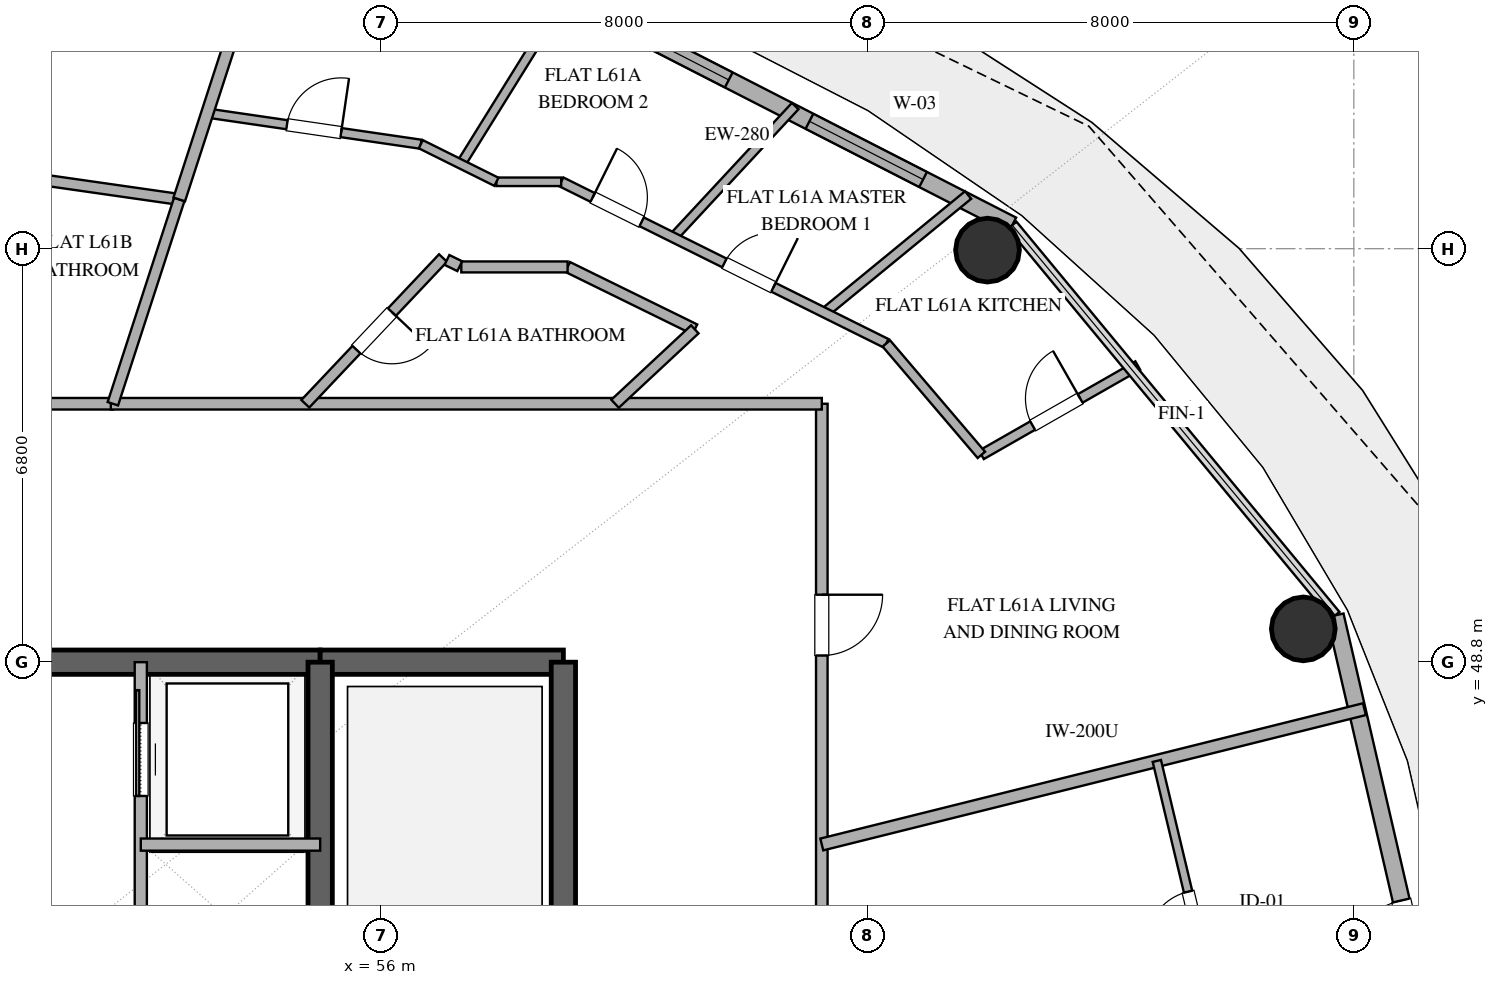
"""IFC4 building model, lengths in metres.
Left out: names, types, materials, properties, quantities, classifications, styles, units other than length and angle.
Written with IfcOpenShell. Run it as: python <this file> out.ifc"""

import sys

from ifc_helpers import new_model, si_unit, direction, frame, frame_2d, origin, origin_2d, place, context, subcontext, project, spatial, rectangle, hollow_circle, extrude, element, fill, save


model = new_model("IFC4")
c1 = context("Model", 3, precision=1e-05, world=origin(), true_north=direction((0.0, 1.0)))
c2 = subcontext(c1, "Body", "Model", "MODEL_VIEW")
j1 = project(units=[si_unit("LENGTHUNIT", "METRE"), si_unit("PLANEANGLEUNIT", "RADIAN")], contexts=[c1])
p1 = place(None, origin())
s1 = spatial("IfcSite", under=j1, at=p1, CompositionType="ELEMENT")
p2 = place(p1, origin())
s2 = spatial("IfcBuilding", under=s1, at=p2, CompositionType="ELEMENT")
p3 = place(p2, frame((0.0, 0.0, 238.8)))
s3 = spatial("IfcBuildingStorey", under=s2, at=p3, CompositionType="ELEMENT", Elevation=238.8)
p4 = place(p3, frame((41.0, 48.8, 0.0), z_axis=(0.0, 0.0, 1.0), x_axis=(1.0, 0.0, 0.0)))
e1 = element("IfcWall", 1, at=p4, inside=s3, PredefinedType="SHEAR", context=c2, shape_type="SweptSolid", body=[
    extrude(rectangle(XDim=14.0, YDim=0.4, at=frame_2d((7.0, 0.0))), origin(), (0.0, 0.0, 1.0), 3.36),
])
p5 = place(p4, frame((6.1, 0.0, 0.0)))
e2 = element("IfcOpeningElement", 2, at=p5, cuts=e1, PredefinedType="OPENING", context=c2, shape_type="SweptSolid", body=[
    extrude(rectangle(XDim=1.8, YDim=2.25, at=frame_2d((0.9, 1.125))), frame((0.0, 0.21, 0.0), z_axis=(0.0, -1.0, 0.0), x_axis=(1.0, 0.0, 0.0)), (0.0, 0.0, 1.0), 0.42),
])
p6 = place(p3, frame((55.0, 48.8, 0.0), z_axis=(0.0, 0.0, 1.0), x_axis=(1.0, 0.0, 0.0)))
e3 = element("IfcWall", 3, at=p6, inside=s3, PredefinedType="SHEAR", context=c2, shape_type="SweptSolid", body=[
    extrude(rectangle(XDim=4.0, YDim=0.4, at=frame_2d((2.0, 0.0))), origin(), (0.0, 0.0, 1.0), 3.36),
])
p7 = place(p3, frame((59.0, 35.2, 0.0), z_axis=(0.0, 0.0, 1.0), x_axis=(0.0, 1.0, 0.0)))
e4 = element("IfcWall", 4, at=p7, inside=s3, PredefinedType="SHEAR", context=c2, shape_type="SweptSolid", body=[
    extrude(rectangle(XDim=13.6, YDim=0.4, at=frame_2d((6.8, 0.0))), origin(), (0.0, 0.0, 1.0), 3.36),
])
p8 = place(p3, frame((55.0, 35.2, 0.0), z_axis=(0.0, 0.0, 1.0), x_axis=(0.0, 1.0, 0.0)))
e5 = element("IfcWall", 5, at=p8, inside=s3, PredefinedType="SHEAR", context=c2, shape_type="SweptSolid", body=[
    extrude(rectangle(XDim=13.6, YDim=0.4, at=frame_2d((6.8, 0.0))), origin(), (0.0, 0.0, 1.0), 3.36),
])
p9 = place(p8, frame((1.15, 0.0, 0.0)))
e6 = element("IfcOpeningElement", 6, at=p9, cuts=e5, PredefinedType="OPENING", context=c2, shape_type="SweptSolid", body=[
    extrude(rectangle(XDim=1.1, YDim=2.2, at=frame_2d((0.55, 1.1))), frame((0.0, 0.21, 0.0), z_axis=(0.0, -1.0, 0.0), x_axis=(1.0, 0.0, 0.0)), (0.0, 0.0, 1.0), 0.42),
])
for number, where, z_axis, x_axis in (
    (7, (71.169, 49.347, 0.0), (0.0, 0.0, 1.0), (1.0, 0.0, 0.0)),
    (8, (65.975, 55.576, 0.0), (0.0, 0.0, 1.0), (1.0, 0.0, 0.0)),
):
    element("IfcColumn", number, at=place(p3, frame(where, z_axis=z_axis, x_axis=x_axis)), inside=s3, PredefinedType="COLUMN", context=c2, shape_type="SweptSolid", body=[
        extrude(hollow_circle(Radius=0.525, WallThickness=0.028, at=origin_2d()), origin(), (0.0, 0.0, 1.0), 3.36),
    ])
p10 = place(p3, frame((73.447, 42.0, 0.0), z_axis=(0.0, 0.0, 1.0), x_axis=(-0.225635078214, 0.974211892495, 0.0)))
e9 = element("IfcWall", 9, at=p10, inside=s3, PredefinedType="SOLIDWALL", context=c2, shape_type="SweptSolid", body=[
    extrude(rectangle(XDim=7.77, YDim=0.28, at=frame_2d((3.885, 0.0))), origin(), (0.0, 0.0, 1.0), 3.36),
])
p11 = place(p10, frame((1.557, 0.0, 0.0)))
e10 = element("IfcOpeningElement", 10, at=p11, cuts=e9, PredefinedType="OPENING", context=c2, shape_type="SweptSolid", body=[
    extrude(rectangle(XDim=1.4, YDim=2.2, at=frame_2d((0.7, 1.1))), frame((0.0, 0.15, 0.0), z_axis=(0.0, -1.0, 0.0), x_axis=(1.0, 0.0, 0.0)), (0.0, 0.0, 1.0), 0.3),
])
p12 = place(p3, frame((66.383, 55.987, 0.0), z_axis=(0.0, 0.0, 1.0), x_axis=(-0.890007394051, 0.455946091699, 0.0)))
e11 = element("IfcWall", 11, at=p12, inside=s3, PredefinedType="SOLIDWALL", context=c2, shape_type="SweptSolid", body=[
    extrude(rectangle(XDim=9.404, YDim=0.28, at=frame_2d((4.702, 0.0))), origin(), (0.0, 0.0, 1.0), 3.36),
])
p13 = place(p12, frame((1.648, 0.0, 0.85)))
e12 = element("IfcOpeningElement", 12, at=p13, cuts=e11, PredefinedType="OPENING", context=c2, shape_type="SweptSolid", body=[
    extrude(rectangle(XDim=2.1, YDim=2.2, at=frame_2d((1.05, 1.1))), frame((0.0, 0.15, 0.0), z_axis=(0.0, -1.0, 0.0), x_axis=(1.0, 0.0, 0.0)), (0.0, 0.0, 1.0), 0.3),
])
p14 = place(p12, frame((5.239, 0.0, 0.85)))
e13 = element("IfcOpeningElement", 13, at=p14, cuts=e11, PredefinedType="OPENING", context=c2, shape_type="SweptSolid", body=[
    extrude(rectangle(XDim=1.8, YDim=2.2, at=frame_2d((0.9, 1.1))), frame((0.0, 0.15, 0.0), z_axis=(0.0, -1.0, 0.0), x_axis=(1.0, 0.0, 0.0)), (0.0, 0.0, 1.0), 0.3),
])
p15 = place(p3, frame((52.05, 38.4, 0.0), z_axis=(0.0, 0.0, 1.0), x_axis=(0.0, 1.0, 0.0)))
e14 = element("IfcWall", 14, at=p15, inside=s3, PredefinedType="SOLIDWALL", context=c2, shape_type="SweptSolid", body=[
    extrude(rectangle(XDim=10.4, YDim=0.2, at=frame_2d((5.2, 0.0))), origin(), (0.0, 0.0, 1.0), 2.72),
])
p16 = place(p15, frame((0.7, 0.0, 0.0)))
e15 = element("IfcOpeningElement", 15, at=p16, cuts=e14, PredefinedType="OPENING", context=c2, shape_type="SweptSolid", body=[
    extrude(rectangle(XDim=1.1, YDim=2.2, at=frame_2d((0.55, 1.1))), frame((0.0, 0.11, 0.0), z_axis=(0.0, -1.0, 0.0), x_axis=(1.0, 0.0, 0.0)), (0.0, 0.0, 1.0), 0.22),
])
p17 = place(p15, frame((8.2, 0.0, 0.0)))
e16 = element("IfcOpeningElement", 16, at=p17, cuts=e14, PredefinedType="OPENING", context=c2, shape_type="SweptSolid", body=[
    extrude(rectangle(XDim=1.2, YDim=2.2, at=frame_2d((0.6, 1.1))), frame((0.0, 0.11, 0.0), z_axis=(0.0, -1.0, 0.0), x_axis=(1.0, 0.0, 0.0)), (0.0, 0.0, 1.0), 0.22),
])
p18 = place(p3, frame((52.05, 45.8, 0.0), z_axis=(0.0, 0.0, 1.0), x_axis=(1.0, 0.0, 0.0)))
e17 = element("IfcWall", 17, at=p18, inside=s3, PredefinedType="SOLIDWALL", context=c2, shape_type="SweptSolid", body=[
    extrude(rectangle(XDim=2.95, YDim=0.2, at=frame_2d((1.475, 0.0))), origin(), (0.0, 0.0, 1.0), 2.72),
])
p19 = place(p3, frame((32.75, 53.05, 0.0), z_axis=(0.0, 0.0, 1.0), x_axis=(1.0, 0.0, 0.0)))
e18 = element("IfcWall", 18, at=p19, inside=s3, PredefinedType="PARTITIONING", context=c2, shape_type="SweptSolid", body=[
    extrude(rectangle(XDim=18.84, YDim=0.19, at=frame_2d((9.42, 0.0))), origin(), (0.0, 0.0, 1.0), 2.72),
])
p20 = place(p19, frame((11.305, 0.0, 0.0)))
e19 = element("IfcOpeningElement", 19, at=p20, cuts=e18, PredefinedType="OPENING", context=c2, shape_type="SweptSolid", body=[
    extrude(rectangle(XDim=1.0, YDim=2.2, at=frame_2d((0.5, 1.1))), frame((0.0, 0.105, 0.0), z_axis=(0.0, -1.0, 0.0), x_axis=(1.0, 0.0, 0.0)), (0.0, 0.0, 1.0), 0.21),
])
p21 = place(p19, frame((2.829, 0.0, 0.0)))
e20 = element("IfcOpeningElement", 20, at=p21, cuts=e18, PredefinedType="OPENING", context=c2, shape_type="SweptSolid", body=[
    extrude(rectangle(XDim=1.0, YDim=2.2, at=frame_2d((0.5, 1.1))), frame((0.0, 0.105, 0.0), z_axis=(0.0, -1.0, 0.0), x_axis=(1.0, 0.0, 0.0)), (0.0, 0.0, 1.0), 0.21),
])
p22 = place(p3, frame((63.25, 53.05, 0.0), z_axis=(0.0, 0.0, 1.0), x_axis=(0.0, -1.0, 0.0)))
e21 = element("IfcWall", 21, at=p22, inside=s3, PredefinedType="PARTITIONING", context=c2, shape_type="SweptSolid", body=[
    extrude(rectangle(XDim=16.335, YDim=0.19, at=frame_2d((8.167, 0.0))), origin(), (0.0, 0.0, 1.0), 2.72),
])
p23 = place(p22, frame((3.14, 0.0, 0.0)))
e22 = element("IfcOpeningElement", 22, at=p23, cuts=e21, PredefinedType="OPENING", context=c2, shape_type="SweptSolid", body=[
    extrude(rectangle(XDim=1.0, YDim=2.2, at=frame_2d((0.5, 1.1))), frame((0.0, 0.105, 0.0), z_axis=(0.0, -1.0, 0.0), x_axis=(1.0, 0.0, 0.0)), (0.0, 0.0, 1.0), 0.21),
])
p24 = place(p22, frame((10.111, 0.0, 0.0)))
e23 = element("IfcOpeningElement", 23, at=p24, cuts=e21, PredefinedType="OPENING", context=c2, shape_type="SweptSolid", body=[
    extrude(rectangle(XDim=1.0, YDim=2.2, at=frame_2d((0.5, 1.1))), frame((0.0, 0.105, 0.0), z_axis=(0.0, -1.0, 0.0), x_axis=(1.0, 0.0, 0.0)), (0.0, 0.0, 1.0), 0.21),
])
p25 = place(p3, frame((63.25, 45.802, 0.0), z_axis=(0.0, 0.0, 1.0), x_axis=(0.970293772743, 0.241929730659, 0.0)))
e24 = element("IfcWall", 24, at=p25, inside=s3, PredefinedType="PARTITIONING", context=c2, shape_type="SweptSolid", body=[
    extrude(rectangle(XDim=9.197, YDim=0.2, at=frame_2d((4.599, 0.0))), origin(), (0.0, 0.0, 1.0), 2.72),
])
p26 = place(p3, frame((69.996, 42.0, 0.0), z_axis=(0.0, 0.0, 1.0), x_axis=(-0.232321322639, 0.972639091877, 0.0)))
e25 = element("IfcWall", 25, at=p26, inside=s3, PredefinedType="PARTITIONING", context=c2, shape_type="SweptSolid", body=[
    extrude(rectangle(XDim=5.322, YDim=0.14, at=frame_2d((2.661, 0.0))), origin(), (0.0, 0.0, 1.0), 2.72),
])
p27 = place(p26, frame((2.211, 0.0, 0.0)))
e26 = element("IfcOpeningElement", 26, at=p27, cuts=e25, PredefinedType="OPENING", context=c2, shape_type="SweptSolid", body=[
    extrude(rectangle(XDim=0.9, YDim=2.1, at=frame_2d((0.45, 1.05))), frame((0.0, 0.08, 0.0), z_axis=(0.0, -1.0, 0.0), x_axis=(1.0, 0.0, 0.0)), (0.0, 0.0, 1.0), 0.16),
])
p28 = place(p3, frame((51.557, 53.05, 0.0), z_axis=(0.0, 0.0, 1.0), x_axis=(1.0, 0.0, 0.0)))
e27 = element("IfcWall", 27, at=p28, inside=s3, PredefinedType="PARTITIONING", context=c2, shape_type="SweptSolid", body=[
    extrude(rectangle(XDim=11.693, YDim=0.19, at=frame_2d((5.847, 0.0))), origin(), (0.0, 0.0, 1.0), 2.72),
])
p29 = place(p3, frame((48.859, 56.957, 0.0), z_axis=(0.0, 0.0, 1.0), x_axis=(0.989916598229, -0.141651433282, 0.0)))
e28 = element("IfcWall", 28, at=p29, inside=s3, PredefinedType="PLUMBINGWALL", context=c2, shape_type="SweptSolid", body=[
    extrude(rectangle(XDim=3.863, YDim=0.18, at=frame_2d((1.931, 0.0))), origin(), (0.0, 0.0, 1.0), 2.72),
])
p30 = place(p3, frame((53.144, 57.83, 0.0), z_axis=(0.0, 0.0, 1.0), x_axis=(0.98952683964, -0.144348999414, 0.0)))
e29 = element("IfcWall", 29, at=p30, inside=s3, PredefinedType="PARTITIONING", context=c2, shape_type="SweptSolid", body=[
    extrude(rectangle(XDim=3.548, YDim=0.15, at=frame_2d((1.774, 0.0))), origin(), (0.0, 0.0, 1.0), 2.72),
])
p31 = place(p30, frame((1.324, 0.0, 0.0)))
e30 = element("IfcOpeningElement", 30, at=p31, cuts=e29, PredefinedType="OPENING", context=c2, shape_type="SweptSolid", body=[
    extrude(rectangle(XDim=0.9, YDim=2.1, at=frame_2d((0.45, 1.05))), frame((0.0, 0.085, 0.0), z_axis=(0.0, -1.0, 0.0), x_axis=(1.0, 0.0, 0.0)), (0.0, 0.0, 1.0), 0.17),
])
p32 = place(p3, frame((52.682, 56.41, 0.0), z_axis=(0.0, 0.0, 1.0), x_axis=(-0.309025133622, -0.951053871655, 0.0)))
e31 = element("IfcWall", 31, at=p32, inside=s3, PredefinedType="PLUMBINGWALL", context=c2, shape_type="SweptSolid", body=[
    extrude(rectangle(XDim=3.533, YDim=0.18, at=frame_2d((1.767, 0.0))), origin(), (0.0, 0.0, 1.0), 2.72),
])
p33 = place(p3, frame((57.314, 56.99, 0.0), z_axis=(0.0, 0.0, 1.0), x_axis=(0.527732275503, 0.849410763643, 0.0)))
e32 = element("IfcWall", 32, at=p33, inside=s3, PredefinedType="PARTITIONING", context=c2, shape_type="SweptSolid", body=[
    extrude(rectangle(XDim=3.372, YDim=0.15, at=frame_2d((1.686, 0.0))), origin(), (0.0, 0.0, 1.0), 2.72),
])
p34 = place(p3, frame((54.165, 60.973, 0.0), z_axis=(0.0, 0.0, 1.0), x_axis=(-0.309012424199, -0.951058001223, 0.0)))
e33 = element("IfcWall", 33, at=p34, inside=s3, PredefinedType="PARTITIONING", context=c2, shape_type="SweptSolid", body=[
    extrude(rectangle(XDim=4.797, YDim=0.2, at=frame_2d((2.399, 0.0))), origin(), (0.0, 0.0, 1.0), 2.72),
])
p35 = place(p3, frame((57.021, 55.446, 0.0), z_axis=(0.0, 0.0, 1.0), x_axis=(-0.686947406922, -0.726707135044, 0.0)))
e34 = element("IfcWall", 34, at=p35, inside=s3, PredefinedType="PLUMBINGWALL", context=c2, shape_type="SweptSolid", body=[
    extrude(rectangle(XDim=3.297, YDim=0.18, at=frame_2d((1.649, 0.0))), origin(), (0.0, 0.0, 1.0), 2.72),
])
p36 = place(p35, frame((1.224, 0.0, 0.0)))
e35 = element("IfcOpeningElement", 35, at=p36, cuts=e34, PredefinedType="OPENING", context=c2, shape_type="SweptSolid", body=[
    extrude(rectangle(XDim=0.85, YDim=2.1, at=frame_2d((0.425, 1.05))), frame((0.0, 0.1, 0.0), z_axis=(0.0, -1.0, 0.0), x_axis=(1.0, 0.0, 0.0)), (0.0, 0.0, 1.0), 0.2),
])
p37 = place(p3, frame((63.296, 54.547, 0.0), z_axis=(0.0, 0.0, 1.0), x_axis=(0.773154828325, 0.634217321931, 0.0)))
e36 = element("IfcWall", 36, at=p37, inside=s3, PredefinedType="PLUMBINGWALL", context=c2, shape_type="SweptSolid", body=[
    extrude(rectangle(XDim=3.052, YDim=0.16, at=frame_2d((1.526, 0.0))), origin(), (0.0, 0.0, 1.0), 2.72),
])
p38 = place(p3, frame((65.875, 52.209, 0.0), z_axis=(0.0, 0.0, 1.0), x_axis=(0.868349640853, 0.495952519128, 0.0)))
e37 = element("IfcWall", 37, at=p38, inside=s3, PredefinedType="PLUMBINGWALL", context=c2, shape_type="SweptSolid", body=[
    extrude(rectangle(XDim=2.962, YDim=0.16, at=frame_2d((1.481, 0.0))), origin(), (0.0, 0.0, 1.0), 2.72),
])
p39 = place(p38, frame((0.971, 0.0, 0.0)))
e38 = element("IfcOpeningElement", 38, at=p39, cuts=e37, PredefinedType="OPENING", context=c2, shape_type="SweptSolid", body=[
    extrude(rectangle(XDim=0.9, YDim=2.1, at=frame_2d((0.45, 1.05))), frame((0.0, 0.09, 0.0), z_axis=(0.0, -1.0, 0.0), x_axis=(1.0, 0.0, 0.0)), (0.0, 0.0, 1.0), 0.18),
])
p40 = place(p3, frame((62.812, 57.945, 0.0), z_axis=(0.0, 0.0, 1.0), x_axis=(-0.680590804007, -0.732663741085, 0.0)))
e39 = element("IfcWall", 39, at=p40, inside=s3, PredefinedType="PARTITIONING", context=c2, shape_type="SweptSolid", body=[
    extrude(rectangle(XDim=2.949, YDim=0.15, at=frame_2d((1.475, 0.0))), origin(), (0.0, 0.0, 1.0), 2.72),
])
p41 = place(p3, frame((58.964, 56.7, 0.0), z_axis=(0.0, 0.0, 1.0), x_axis=(0.895471406875, -0.445119039661, 0.0)))
e40 = element("IfcWall", 40, at=p41, inside=s3, PredefinedType="PLUMBINGWALL", context=c2, shape_type="SweptSolid", body=[
    extrude(rectangle(XDim=5.971, YDim=0.16, at=frame_2d((2.986, 0.0))), origin(), (0.0, 0.0, 1.0), 2.72),
])
p42 = place(p41, frame((2.998, 0.0, 0.0)))
e41 = element("IfcOpeningElement", 41, at=p42, cuts=e40, PredefinedType="OPENING", context=c2, shape_type="SweptSolid", body=[
    extrude(rectangle(XDim=0.9, YDim=2.1, at=frame_2d((0.45, 1.05))), frame((0.0, 0.09, 0.0), z_axis=(0.0, -1.0, 0.0), x_axis=(1.0, 0.0, 0.0)), (0.0, 0.0, 1.0), 0.18),
])
p43 = place(p41, frame((0.578, 0.0, 0.0)))
e42 = element("IfcOpeningElement", 42, at=p43, cuts=e40, PredefinedType="OPENING", context=c2, shape_type="SweptSolid", body=[
    extrude(rectangle(XDim=0.9, YDim=2.1, at=frame_2d((0.45, 1.05))), frame((0.0, 0.09, 0.0), z_axis=(0.0, -1.0, 0.0), x_axis=(1.0, 0.0, 0.0)), (0.0, 0.0, 1.0), 0.18),
])
p44 = place(p3, frame((64.311, 54.042, 0.0), z_axis=(0.0, 0.0, 1.0), x_axis=(0.648953507232, -0.760828065631, 0.0)))
e43 = element("IfcWall", 43, at=p44, inside=s3, PredefinedType="PLUMBINGWALL", context=c2, shape_type="SweptSolid", body=[
    extrude(rectangle(XDim=2.409, YDim=0.16, at=frame_2d((1.205, 0.0))), origin(), (0.0, 0.0, 1.0), 2.72),
])
p45 = place(p3, frame((61.162, 54.273, 0.0), z_axis=(0.0, 0.0, 1.0), x_axis=(-0.897774561906, 0.440455259925, 0.0)))
e44 = element("IfcWall", 44, at=p45, inside=s3, PredefinedType="PLUMBINGWALL", context=c2, shape_type="SweptSolid", body=[
    extrude(rectangle(XDim=2.331, YDim=0.18, at=frame_2d((1.166, 0.0))), origin(), (0.0, 0.0, 1.0), 2.72),
])
p46 = place(p3, frame((59.85, 53.05, 0.0), z_axis=(0.0, 0.0, 1.0), x_axis=(0.731376514485, 0.681973895438, 0.0)))
e45 = element("IfcWall", 45, at=p46, inside=s3, PredefinedType="PLUMBINGWALL", context=c2, shape_type="SweptSolid", body=[
    extrude(rectangle(XDim=1.794, YDim=0.18, at=frame_2d((0.897, 0.0))), origin(), (0.0, 0.0, 1.0), 2.72),
])
p47 = place(p3, frame((59.069, 55.3, 0.0), z_axis=(0.0, 0.0, 1.0), x_axis=(-1.0, 0.0, 0.0)))
e46 = element("IfcWall", 46, at=p47, inside=s3, PredefinedType="PLUMBINGWALL", context=c2, shape_type="SweptSolid", body=[
    extrude(rectangle(XDim=1.748, YDim=0.18, at=frame_2d((0.874, 0.0))), origin(), (0.0, 0.0, 1.0), 2.72),
])
p48 = place(p3, frame((58.964, 56.7, 0.0), z_axis=(0.0, 0.0, 1.0), x_axis=(-1.0, 0.0, 0.0)))
e47 = element("IfcWall", 47, at=p48, inside=s3, PredefinedType="PARTITIONING", context=c2, shape_type="SweptSolid", body=[
    extrude(rectangle(XDim=1.065, YDim=0.14, at=frame_2d((0.533, 0.0))), origin(), (0.0, 0.0, 1.0), 2.72),
])
p49 = place(p3, frame((56.655, 57.318, 0.0), z_axis=(0.0, 0.0, 1.0), x_axis=(0.895584310315, -0.444891833053, 0.0)))
e48 = element("IfcWall", 48, at=p49, inside=s3, PredefinedType="PARTITIONING", context=c2, shape_type="SweptSolid", body=[
    extrude(rectangle(XDim=1.389, YDim=0.15, at=frame_2d((0.694, 0.0))), origin(), (0.0, 0.0, 1.0), 2.72),
])
p50 = place(p3, frame((57.296, 55.312, 0.0), z_axis=(0.0, 0.0, 1.0), x_axis=(-0.898768445644, 0.438423632021, 0.0)))
e49 = element("IfcWall", 49, at=p50, inside=s3, PredefinedType="PLUMBINGWALL", context=c2, shape_type="SweptSolid", body=[
    extrude(rectangle(XDim=0.234, YDim=0.18, at=frame_2d((0.117, 0.0))), origin(), (0.0, 0.0, 1.0), 2.72),
])
p51 = place(p11, origin())
e50 = element("IfcDoor", 50, at=p51, inside=s3, OperationType="SINGLE_SWING_LEFT", PredefinedType="DOOR", context=c2, shape_type="SweptSolid", body=[
    extrude(rectangle(XDim=1.4, YDim=2.2, at=frame_2d((0.7, 1.1))), frame((0.0, 0.025, 0.0), z_axis=(0.0, -1.0, 0.0), x_axis=(1.0, 0.0, 0.0)), (0.0, 0.0, 1.0), 0.05),
])
fill(e10, e50)
p52 = place(p13, origin())
e51 = element("IfcWindow", 51, at=p52, inside=s3, PartitioningType="SINGLE_PANEL", PredefinedType="WINDOW", context=c2, shape_type="SweptSolid", body=[
    extrude(rectangle(XDim=2.1, YDim=2.2, at=frame_2d((1.05, 1.1))), frame((0.0, 0.03, 0.0), z_axis=(0.0, -1.0, 0.0), x_axis=(1.0, 0.0, 0.0)), (0.0, 0.0, 1.0), 0.06),
])
fill(e12, e51)
p53 = place(p14, origin())
e52 = element("IfcWindow", 52, at=p53, inside=s3, PartitioningType="SINGLE_PANEL", PredefinedType="WINDOW", context=c2, shape_type="SweptSolid", body=[
    extrude(rectangle(XDim=1.8, YDim=2.2, at=frame_2d((0.9, 1.1))), frame((0.0, 0.03, 0.0), z_axis=(0.0, -1.0, 0.0), x_axis=(1.0, 0.0, 0.0)), (0.0, 0.0, 1.0), 0.06),
])
fill(e13, e52)
p54 = place(p17, origin())
e53 = element("IfcDoor", 53, at=p54, inside=s3, OperationType="SLIDING_TO_RIGHT", PredefinedType="DOOR", context=c2, shape_type="SweptSolid", body=[
    extrude(rectangle(XDim=1.2, YDim=2.2, at=frame_2d((0.6, 1.1))), frame((0.0, 0.025, 0.0), z_axis=(0.0, -1.0, 0.0), x_axis=(1.0, 0.0, 0.0)), (0.0, 0.0, 1.0), 0.05),
])
fill(e16, e53)
p55 = place(p23, origin())
e54 = element("IfcDoor", 54, at=p55, inside=s3, OperationType="SINGLE_SWING_LEFT", PredefinedType="DOOR", context=c2, shape_type="SweptSolid", body=[
    extrude(rectangle(XDim=1.0, YDim=2.2, at=frame_2d((0.5, 1.1))), frame((0.0, 0.025, 0.0), z_axis=(0.0, -1.0, 0.0), x_axis=(1.0, 0.0, 0.0)), (0.0, 0.0, 1.0), 0.05),
])
fill(e22, e54)
p56 = place(p27, origin())
e55 = element("IfcDoor", 55, at=p56, inside=s3, OperationType="SINGLE_SWING_LEFT", PredefinedType="DOOR", context=c2, shape_type="SweptSolid", body=[
    extrude(rectangle(XDim=0.9, YDim=2.1, at=frame_2d((0.45, 1.05))), frame((0.0, 0.025, 0.0), z_axis=(0.0, -1.0, 0.0), x_axis=(1.0, 0.0, 0.0)), (0.0, 0.0, 1.0), 0.05),
])
fill(e26, e55)
p57 = place(p31, origin())
e56 = element("IfcDoor", 56, at=p57, inside=s3, OperationType="SINGLE_SWING_RIGHT", PredefinedType="DOOR", context=c2, shape_type="SweptSolid", body=[
    extrude(rectangle(XDim=0.9, YDim=2.1, at=frame_2d((0.45, 1.05))), frame((0.0, 0.025, 0.0), z_axis=(0.0, -1.0, 0.0), x_axis=(1.0, 0.0, 0.0)), (0.0, 0.0, 1.0), 0.05),
])
fill(e30, e56)
p58 = place(p36, origin())
e57 = element("IfcDoor", 57, at=p58, inside=s3, OperationType="SINGLE_SWING_LEFT", PredefinedType="DOOR", context=c2, shape_type="SweptSolid", body=[
    extrude(rectangle(XDim=0.85, YDim=2.1, at=frame_2d((0.425, 1.05))), frame((0.0, 0.025, 0.0), z_axis=(0.0, -1.0, 0.0), x_axis=(1.0, 0.0, 0.0)), (0.0, 0.0, 1.0), 0.05),
])
fill(e35, e57)
p59 = place(p39, origin())
e58 = element("IfcDoor", 58, at=p59, inside=s3, OperationType="SINGLE_SWING_RIGHT", PredefinedType="DOOR", context=c2, shape_type="SweptSolid", body=[
    extrude(rectangle(XDim=0.9, YDim=2.1, at=frame_2d((0.45, 1.05))), frame((0.0, 0.025, 0.0), z_axis=(0.0, -1.0, 0.0), x_axis=(1.0, 0.0, 0.0)), (0.0, 0.0, 1.0), 0.05),
])
fill(e38, e58)
p60 = place(p42, origin())
e59 = element("IfcDoor", 59, at=p60, inside=s3, OperationType="SINGLE_SWING_RIGHT", PredefinedType="DOOR", context=c2, shape_type="SweptSolid", body=[
    extrude(rectangle(XDim=0.9, YDim=2.1, at=frame_2d((0.45, 1.05))), frame((0.0, 0.025, 0.0), z_axis=(0.0, -1.0, 0.0), x_axis=(1.0, 0.0, 0.0)), (0.0, 0.0, 1.0), 0.05),
])
fill(e41, e59)
p61 = place(p43, origin())
e60 = element("IfcDoor", 60, at=p61, inside=s3, OperationType="SINGLE_SWING_LEFT", PredefinedType="DOOR", context=c2, shape_type="SweptSolid", body=[
    extrude(rectangle(XDim=0.9, YDim=2.1, at=frame_2d((0.45, 1.05))), frame((0.0, 0.025, 0.0), z_axis=(0.0, -1.0, 0.0), x_axis=(1.0, 0.0, 0.0)), (0.0, 0.0, 1.0), 0.05),
])
fill(e42, e60)
save(model, sys.argv[1])
